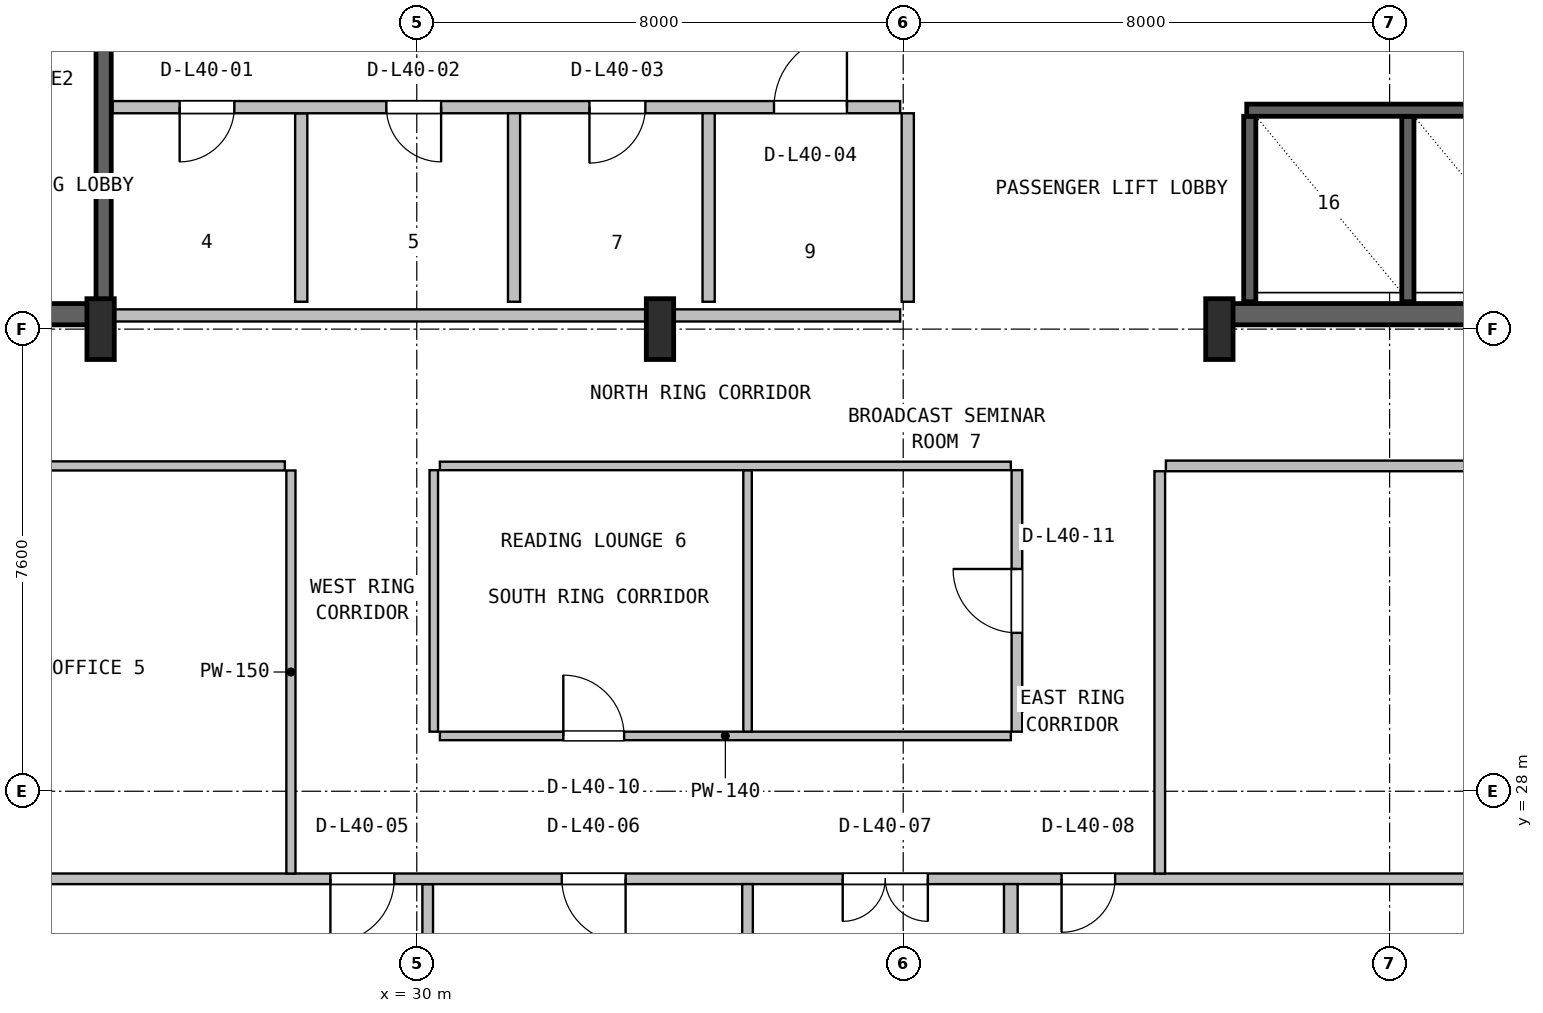
"""IFC4 building model, lengths in metres.
Left out: names, types, materials, properties, quantities, classifications, styles, units other than length and angle.
Written with IfcOpenShell. Run it as: python <this file> out.ifc"""

import sys

from ifc_helpers import new_model, si_unit, direction, frame, frame_2d, origin, origin_2d, place, context, subcontext, project, spatial, rectangle, i_section, extrude, source, transform, mapped, element, fill, save


model = new_model("IFC4")
c1 = context("Model", 3, precision=1e-05, world=origin(), true_north=direction((0.0, 1.0)))
c2 = subcontext(c1, "Body", "Model", "MODEL_VIEW")
j1 = project(units=[si_unit("LENGTHUNIT", "METRE"), si_unit("PLANEANGLEUNIT", "RADIAN")], contexts=[c1])
p1 = place(None, origin())
s1 = spatial("IfcSite", under=j1, at=p1, CompositionType="ELEMENT")
p2 = place(p1, origin())
s2 = spatial("IfcBuilding", under=s1, at=p2, CompositionType="ELEMENT")
p3 = place(p2, frame((0.0, 0.0, 164.8)))
s3 = spatial("IfcBuildingStorey", under=s2, at=p3, CompositionType="ELEMENT", Elevation=164.8)
p4 = place(p3, frame((15.67, 35.845, 0.0), z_axis=(0.0, 0.0, 1.0), x_axis=(1.0, 0.0, 0.0)))
e1 = element("IfcWall", 1, at=p4, inside=s3, PredefinedType="SHEAR", context=c2, shape_type="SweptSolid", body=[
    extrude(rectangle(XDim=9.13, YDim=0.35, at=frame_2d((4.565, 0.0))), origin(), (0.0, 0.0, 1.0), 3.55),
])
p5 = place(p4, frame((5.4, 0.0, 0.0)))
e2 = element("IfcOpeningElement", 2, at=p5, cuts=e1, PredefinedType="OPENING", context=c2, shape_type="SweptSolid", body=[
    extrude(rectangle(XDim=1.0, YDim=2.1, at=frame_2d((0.5, 1.05))), frame((0.0, 0.185, 0.0), z_axis=(0.0, -1.0, 0.0), x_axis=(1.0, 0.0, 0.0)), (0.0, 0.0, 1.0), 0.37),
])
p6 = place(p3, frame((43.2, 35.845, 0.0), z_axis=(0.0, 0.0, 1.0), x_axis=(1.0, 0.0, 0.0)))
e3 = element("IfcWall", 3, at=p6, inside=s3, PredefinedType="SHEAR", context=c2, shape_type="SweptSolid", body=[
    extrude(rectangle(XDim=9.13, YDim=0.35, at=frame_2d((4.565, 0.0))), origin(), (0.0, 0.0, 1.0), 3.55),
])
p7 = place(p6, frame((6.25, 0.0, 0.0)))
e4 = element("IfcOpeningElement", 4, at=p7, cuts=e3, PredefinedType="OPENING", context=c2, shape_type="SweptSolid", body=[
    extrude(rectangle(XDim=0.95, YDim=2.1, at=frame_2d((0.475, 1.05))), frame((0.0, 0.185, 0.0), z_axis=(0.0, -1.0, 0.0), x_axis=(1.0, 0.0, 0.0)), (0.0, 0.0, 1.0), 0.37),
])
m1 = source(origin(), c2, "Body", "SweptSolid", [
    extrude(i_section(OverallWidth=0.45, OverallDepth=1.0, WebThickness=0.016, FlangeThickness=0.03, FilletRadius=0.016, at=origin_2d()), origin(), (0.0, 0.0, 1.0), 3.8),
])
for number, where, z_axis, x_axis in (
    (5, (24.8, 35.6, 0.0), (0.0, 0.0, 1.0), (1.0, 0.0, 0.0)),
    (6, (34.0, 35.6, 0.0), (0.0, 0.0, 1.0), (1.0, 0.0, 0.0)),
    (7, (43.2, 35.6, 0.0), (0.0, 0.0, 1.0), (1.0, 0.0, 0.0)),
):
    element("IfcColumn", number, at=place(p3, frame(where, z_axis=z_axis, x_axis=x_axis)), inside=s3, PredefinedType="COLUMN", context=c2, shape_type="MappedRepresentation", body=[
        mapped(m1, transform((0.0, 0.0, 0.0), x_axis=(1.0, 0.0, 0.0), y_axis=(0.0, 1.0, 0.0), z_axis=(0.0, 0.0, 1.0), scale=1.0)),
    ])
p8 = place(p3, frame((24.85, 36.05, 0.0), z_axis=(0.0, 0.0, 1.0), x_axis=(0.0, 1.0, 0.0)))
e8 = element("IfcWall", 8, at=p8, inside=s3, PredefinedType="SHEAR", context=c2, shape_type="SweptSolid", body=[
    extrude(rectangle(XDim=10.45, YDim=0.25, at=frame_2d((5.225, 0.0))), origin(), (0.0, 0.0, 1.0), 3.55),
])
for number, where, z_axis, x_axis in (
    (9, (43.7, 36.05, 0.0), (0.0, 0.0, 1.0), (0.0, 1.0, 0.0)),
    (10, (46.3, 36.05, 0.0), (0.0, 0.0, 1.0), (0.0, 1.0, 0.0)),
):
    element("IfcWall", number, at=place(p3, frame(where, z_axis=z_axis, x_axis=x_axis)), inside=s3, PredefinedType="SHEAR", context=c2, shape_type="SweptSolid", body=[
        extrude(rectangle(XDim=3.05, YDim=0.2, at=frame_2d((1.525, 0.0))), origin(), (0.0, 0.0, 1.0), 3.55),
    ])
p9 = place(p3, frame((43.65, 39.2, 0.0), z_axis=(0.0, 0.0, 1.0), x_axis=(1.0, 0.0, 0.0)))
e11 = element("IfcWall", 11, at=p9, inside=s3, PredefinedType="SHEAR", context=c2, shape_type="SweptSolid", body=[
    extrude(rectangle(XDim=5.15, YDim=0.2, at=frame_2d((2.575, 0.0))), origin(), (0.0, 0.0, 1.0), 3.55),
])
p10 = place(p3, frame((25.0, 35.825, 0.0), z_axis=(0.0, 0.0, 1.0), x_axis=(1.0, 0.0, 0.0)))
e12 = element("IfcWall", 12, at=p10, inside=s3, PredefinedType="SOLIDWALL", context=c2, shape_type="SweptSolid", body=[
    extrude(rectangle(XDim=12.95, YDim=0.2, at=frame_2d((6.475, 0.0))), origin(), (0.0, 0.0, 1.0), 2.575),
])
p11 = place(p3, frame((28.1, 36.05, 0.0), z_axis=(0.0, 0.0, 1.0), x_axis=(0.0, 1.0, 0.0)))
e13 = element("IfcWall", 13, at=p11, inside=s3, PredefinedType="PLUMBINGWALL", context=c2, shape_type="SweptSolid", body=[
    extrude(rectangle(XDim=3.1, YDim=0.2, at=frame_2d((1.55, 0.0))), origin(), (0.0, 0.0, 1.0), 3.53),
])
p12 = place(p3, frame((25.0, 39.25, 0.0), z_axis=(0.0, 0.0, 1.0), x_axis=(1.0, 0.0, 0.0)))
e14 = element("IfcWall", 14, at=p12, inside=s3, PredefinedType="SOLIDWALL", context=c2, shape_type="SweptSolid", body=[
    extrude(rectangle(XDim=12.95, YDim=0.2, at=frame_2d((6.475, 0.0))), origin(), (0.0, 0.0, 1.0), 3.53),
])
p13 = place(p12, frame((1.1, 0.0, 0.0)))
e15 = element("IfcOpeningElement", 15, at=p13, cuts=e14, PredefinedType="OPENING", context=c2, shape_type="SweptSolid", body=[
    extrude(rectangle(XDim=0.9, YDim=2.06, at=frame_2d((0.45, 1.03))), frame((0.0, 0.11, 0.0), z_axis=(0.0, -1.0, 0.0), x_axis=(1.0, 0.0, 0.0)), (0.0, 0.0, 1.0), 0.22),
])
p14 = place(p12, frame((4.5, 0.0, 0.0)))
e16 = element("IfcOpeningElement", 16, at=p14, cuts=e14, PredefinedType="OPENING", context=c2, shape_type="SweptSolid", body=[
    extrude(rectangle(XDim=0.9, YDim=2.06, at=frame_2d((0.45, 1.03))), frame((0.0, 0.11, 0.0), z_axis=(0.0, -1.0, 0.0), x_axis=(1.0, 0.0, 0.0)), (0.0, 0.0, 1.0), 0.22),
])
p15 = place(p12, frame((7.84, 0.0, 0.0)))
e17 = element("IfcOpeningElement", 17, at=p15, cuts=e14, PredefinedType="OPENING", context=c2, shape_type="SweptSolid", body=[
    extrude(rectangle(XDim=0.92, YDim=2.08, at=frame_2d((0.46, 1.04))), frame((0.0, 0.11, 0.0), z_axis=(0.0, -1.0, 0.0), x_axis=(1.0, 0.0, 0.0)), (0.0, 0.0, 1.0), 0.22),
])
p16 = place(p12, frame((10.875, 0.0, 0.0)))
e18 = element("IfcOpeningElement", 18, at=p16, cuts=e14, PredefinedType="OPENING", context=c2, shape_type="SweptSolid", body=[
    extrude(rectangle(XDim=1.2, YDim=2.1, at=frame_2d((0.6, 1.05))), frame((0.0, 0.11, 0.0), z_axis=(0.0, -1.0, 0.0), x_axis=(1.0, 0.0, 0.0)), (0.0, 0.0, 1.0), 0.22),
])
p17 = place(p3, frame((31.6, 36.05, 0.0), z_axis=(0.0, 0.0, 1.0), x_axis=(0.0, 1.0, 0.0)))
e19 = element("IfcWall", 19, at=p17, inside=s3, PredefinedType="PLUMBINGWALL", context=c2, shape_type="SweptSolid", body=[
    extrude(rectangle(XDim=3.1, YDim=0.2, at=frame_2d((1.55, 0.0))), origin(), (0.0, 0.0, 1.0), 3.53),
])
for number, where, z_axis, x_axis in (
    (20, (34.8, 36.05, 0.0), (0.0, 0.0, 1.0), (0.0, 1.0, 0.0)),
    (21, (38.075, 36.05, 0.0), (0.0, 0.0, 1.0), (0.0, 1.0, 0.0)),
):
    element("IfcWall", number, at=place(p3, frame(where, z_axis=z_axis, x_axis=x_axis)), inside=s3, PredefinedType="SOLIDWALL", context=c2, shape_type="SweptSolid", body=[
        extrude(rectangle(XDim=3.1, YDim=0.2, at=frame_2d((1.55, 0.0))), origin(), (0.0, 0.0, 1.0), 3.53),
    ])
p18 = place(p3, frame((30.18, 7.38, 0.0), z_axis=(0.0, 0.0, 1.0), x_axis=(0.0, 1.0, 0.0)))
e22 = element("IfcWall", 22, at=p18, inside=s3, PredefinedType="PARTITIONING", context=c2, shape_type="SweptSolid", body=[
    extrude(rectangle(XDim=19.093, YDim=0.175, at=frame_2d((9.546, 0.0))), origin(), (0.0, 0.0, 1.0), 2.909),
])
p19 = place(p3, frame((7.18, 26.56, 0.0), z_axis=(0.0, 0.0, 1.0), x_axis=(1.0, 0.0, 0.0)))
e23 = element("IfcWall", 23, at=p19, inside=s3, PredefinedType="PARTITIONING", context=c2, shape_type="SweptSolid", body=[
    extrude(rectangle(XDim=53.64, YDim=0.175, at=frame_2d((26.82, 0.0))), origin(), (0.0, 0.0, 1.0), 2.909),
])
p20 = place(p19, frame((21.4, 0.0, 0.0)))
e24 = element("IfcOpeningElement", 24, at=p20, cuts=e23, PredefinedType="OPENING", context=c2, shape_type="SweptSolid", body=[
    extrude(rectangle(XDim=1.05, YDim=2.1, at=frame_2d((0.525, 1.05))), frame((0.0, 0.098, 0.0), z_axis=(0.0, -1.0, 0.0), x_axis=(1.0, 0.0, 0.0)), (0.0, 0.0, 1.0), 0.195),
])
p21 = place(p19, frame((25.205, 0.0, 0.0)))
e25 = element("IfcOpeningElement", 25, at=p21, cuts=e23, PredefinedType="OPENING", context=c2, shape_type="SweptSolid", body=[
    extrude(rectangle(XDim=1.05, YDim=2.1, at=frame_2d((0.525, 1.05))), frame((0.0, 0.098, 0.0), z_axis=(0.0, -1.0, 0.0), x_axis=(1.0, 0.0, 0.0)), (0.0, 0.0, 1.0), 0.195),
])
p22 = place(p19, frame((29.825, 0.0, 0.0)))
e26 = element("IfcOpeningElement", 26, at=p22, cuts=e23, PredefinedType="OPENING", context=c2, shape_type="SweptSolid", body=[
    extrude(rectangle(XDim=1.4, YDim=2.12, at=frame_2d((0.7, 1.06))), frame((0.0, 0.098, 0.0), z_axis=(0.0, -1.0, 0.0), x_axis=(1.0, 0.0, 0.0)), (0.0, 0.0, 1.0), 0.195),
])
p23 = place(p19, frame((33.425, 0.0, 0.0)))
e27 = element("IfcOpeningElement", 27, at=p23, cuts=e23, PredefinedType="OPENING", context=c2, shape_type="SweptSolid", body=[
    extrude(rectangle(XDim=0.88, YDim=2.06, at=frame_2d((0.44, 1.03))), frame((0.0, 0.098, 0.0), z_axis=(0.0, -1.0, 0.0), x_axis=(1.0, 0.0, 0.0)), (0.0, 0.0, 1.0), 0.195),
])
p24 = place(p3, frame((35.44, 7.38, 0.0), z_axis=(0.0, 0.0, 1.0), x_axis=(0.0, 1.0, 0.0)))
e28 = element("IfcWall", 28, at=p24, inside=s3, PredefinedType="PARTITIONING", context=c2, shape_type="SweptSolid", body=[
    extrude(rectangle(XDim=19.093, YDim=0.175, at=frame_2d((9.546, 0.0))), origin(), (0.0, 0.0, 1.0), 2.909),
])
p25 = place(p3, frame((39.77, 7.38, 0.0), z_axis=(0.0, 0.0, 1.0), x_axis=(0.0, 1.0, 0.0)))
e29 = element("IfcWall", 29, at=p25, inside=s3, PredefinedType="PARTITIONING", context=c2, shape_type="SweptSolid", body=[
    extrude(rectangle(XDim=19.093, YDim=0.225, at=frame_2d((9.546, 0.0))), origin(), (0.0, 0.0, 1.0), 2.909),
])
p26 = place(p3, frame((27.93, 26.647, 0.0), z_axis=(0.0, 0.0, 1.0), x_axis=(0.0, 1.0, 0.0)))
e30 = element("IfcWall", 30, at=p26, inside=s3, PredefinedType="PARTITIONING", context=c2, shape_type="SweptSolid", body=[
    extrude(rectangle(XDim=6.628, YDim=0.15, at=frame_2d((3.314, 0.0))), origin(), (0.0, 0.0, 1.0), 3.222),
])
p27 = place(p3, frame((7.18, 33.35, 0.0), z_axis=(0.0, 0.0, 1.0), x_axis=(1.0, 0.0, 0.0)))
e31 = element("IfcWall", 31, at=p27, inside=s3, PredefinedType="PARTITIONING", context=c2, shape_type="SweptSolid", body=[
    extrude(rectangle(XDim=20.65, YDim=0.15, at=frame_2d((10.325, 0.0))), origin(), (0.0, 0.0, 1.0), 2.909),
])
p28 = place(p27, frame((11.8, 0.0, 0.0)))
e32 = element("IfcOpeningElement", 32, at=p28, cuts=e31, PredefinedType="OPENING", context=c2, shape_type="SweptSolid", body=[
    extrude(rectangle(XDim=0.92, YDim=2.08, at=frame_2d((0.46, 1.04))), frame((0.0, 0.085, 0.0), z_axis=(0.0, -1.0, 0.0), x_axis=(1.0, 0.0, 0.0)), (0.0, 0.0, 1.0), 0.17),
])
p29 = place(p3, frame((30.38, 28.91, 0.0), z_axis=(0.0, 0.0, 1.0), x_axis=(1.0, 0.0, 0.0)))
e33 = element("IfcWall", 33, at=p29, inside=s3, PredefinedType="PARTITIONING", context=c2, shape_type="SweptSolid", body=[
    extrude(rectangle(XDim=9.39, YDim=0.14, at=frame_2d((4.695, 0.0))), origin(), (0.0, 0.0, 1.0), 2.909),
])
p30 = place(p29, frame((2.03, 0.0, 0.0)))
e34 = element("IfcOpeningElement", 34, at=p30, cuts=e33, PredefinedType="OPENING", context=c2, shape_type="SweptSolid", body=[
    extrude(rectangle(XDim=1.0, YDim=2.1, at=frame_2d((0.5, 1.05))), frame((0.0, 0.08, 0.0), z_axis=(0.0, -1.0, 0.0), x_axis=(1.0, 0.0, 0.0)), (0.0, 0.0, 1.0), 0.16),
])
p31 = place(p3, frame((35.44, 28.98, 0.0), z_axis=(0.0, 0.0, 1.0), x_axis=(0.0, 1.0, 0.0)))
e35 = element("IfcWall", 35, at=p31, inside=s3, PredefinedType="PARTITIONING", context=c2, shape_type="SweptSolid", body=[
    extrude(rectangle(XDim=4.3, YDim=0.14, at=frame_2d((2.15, 0.0))), origin(), (0.0, 0.0, 1.0), 3.222),
])
p32 = place(p3, frame((30.38, 33.35, 0.0), z_axis=(0.0, 0.0, 1.0), x_axis=(1.0, 0.0, 0.0)))
e36 = element("IfcWall", 36, at=p32, inside=s3, PredefinedType="PARTITIONING", context=c2, shape_type="SweptSolid", body=[
    extrude(rectangle(XDim=9.39, YDim=0.14, at=frame_2d((4.695, 0.0))), origin(), (0.0, 0.0, 1.0), 2.909),
])
p33 = place(p3, frame((30.28, 28.98, 0.0), z_axis=(0.0, 0.0, 1.0), x_axis=(0.0, 1.0, 0.0)))
e37 = element("IfcWall", 37, at=p33, inside=s3, PredefinedType="PARTITIONING", context=c2, shape_type="SweptSolid", body=[
    extrude(rectangle(XDim=4.3, YDim=0.14, at=frame_2d((2.15, 0.0))), origin(), (0.0, 0.0, 1.0), 3.222),
])
p34 = place(p3, frame((39.87, 28.98, 0.0), z_axis=(0.0, 0.0, 1.0), x_axis=(0.0, 1.0, 0.0)))
e38 = element("IfcWall", 38, at=p34, inside=s3, PredefinedType="PARTITIONING", context=c2, shape_type="SweptSolid", body=[
    extrude(rectangle(XDim=4.3, YDim=0.175, at=frame_2d((2.15, 0.0))), origin(), (0.0, 0.0, 1.0), 3.222),
])
p35 = place(p34, frame((1.625, 0.0, 0.0)))
e39 = element("IfcOpeningElement", 39, at=p35, cuts=e38, PredefinedType="OPENING", context=c2, shape_type="SweptSolid", body=[
    extrude(rectangle(XDim=1.05, YDim=2.1, at=frame_2d((0.525, 1.05))), frame((0.0, 0.098, 0.0), z_axis=(0.0, -1.0, 0.0), x_axis=(1.0, 0.0, 0.0)), (0.0, 0.0, 1.0), 0.195),
])
p36 = place(p3, frame((42.32, 33.35, 0.0), z_axis=(0.0, 0.0, 1.0), x_axis=(1.0, 0.0, 0.0)))
e40 = element("IfcWall", 40, at=p36, inside=s3, PredefinedType="PARTITIONING", context=c2, shape_type="SweptSolid", body=[
    extrude(rectangle(XDim=18.5, YDim=0.175, at=frame_2d((9.25, 0.0))), origin(), (0.0, 0.0, 1.0), 2.909),
])
p37 = place(p36, frame((6.79, 0.0, 0.0)))
e41 = element("IfcOpeningElement", 41, at=p37, cuts=e40, PredefinedType="OPENING", context=c2, shape_type="SweptSolid", body=[
    extrude(rectangle(XDim=1.05, YDim=2.1, at=frame_2d((0.525, 1.05))), frame((0.0, 0.098, 0.0), z_axis=(0.0, -1.0, 0.0), x_axis=(1.0, 0.0, 0.0)), (0.0, 0.0, 1.0), 0.195),
])
p38 = place(p3, frame((42.22, 26.647, 0.0), z_axis=(0.0, 0.0, 1.0), x_axis=(0.0, 1.0, 0.0)))
e42 = element("IfcWall", 42, at=p38, inside=s3, PredefinedType="PARTITIONING", context=c2, shape_type="SweptSolid", body=[
    extrude(rectangle(XDim=6.616, YDim=0.175, at=frame_2d((3.308, 0.0))), origin(), (0.0, 0.0, 1.0), 3.222),
])
m2 = source(origin(), c2, "Body", "SweptSolid", [
    extrude(rectangle(XDim=0.9, YDim=2.06, at=frame_2d((0.45, 1.03))), frame((0.0, 0.025, 0.0), z_axis=(0.0, -1.0, 0.0), x_axis=(1.0, 0.0, 0.0)), (0.0, 0.0, 1.0), 0.05),
])
p39 = place(p13, frame((0.9, 0.0, 0.0), z_axis=(0.0, 0.0, 1.0), x_axis=(-1.0, 0.0, 0.0)))
e43 = element("IfcDoor", 43, at=p39, inside=s3, OperationType="SINGLE_SWING_LEFT", PredefinedType="DOOR", context=c2, shape_type="MappedRepresentation", body=[
    mapped(m2, transform((0.0, 0.0, 0.0), x_axis=(1.0, 0.0, 0.0), y_axis=(0.0, 1.0, 0.0), z_axis=(0.0, 0.0, 1.0), scale=1.0)),
])
fill(e15, e43)
p40 = place(p14, frame((0.9, 0.0, 0.0), z_axis=(0.0, 0.0, 1.0), x_axis=(-1.0, 0.0, 0.0)))
e44 = element("IfcDoor", 44, at=p40, inside=s3, OperationType="SINGLE_SWING_RIGHT", PredefinedType="DOOR", context=c2, shape_type="MappedRepresentation", body=[
    mapped(m2, transform((0.0, 0.0, 0.0), x_axis=(1.0, 0.0, 0.0), y_axis=(0.0, 1.0, 0.0), z_axis=(0.0, 0.0, 1.0), scale=1.0)),
])
fill(e16, e44)
m3 = source(origin(), c2, "Body", "SweptSolid", [
    extrude(rectangle(XDim=0.92, YDim=2.08, at=frame_2d((0.46, 1.04))), frame((0.0, 0.025, 0.0), z_axis=(0.0, -1.0, 0.0), x_axis=(1.0, 0.0, 0.0)), (0.0, 0.0, 1.0), 0.05),
])
p41 = place(p15, frame((0.92, 0.0, 0.0), z_axis=(0.0, 0.0, 1.0), x_axis=(-1.0, 0.0, 0.0)))
e45 = element("IfcDoor", 45, at=p41, inside=s3, OperationType="SINGLE_SWING_LEFT", PredefinedType="DOOR", context=c2, shape_type="MappedRepresentation", body=[
    mapped(m3, transform((0.0, 0.0, 0.0), x_axis=(1.0, 0.0, 0.0), y_axis=(0.0, 1.0, 0.0), z_axis=(0.0, 0.0, 1.0), scale=1.0)),
])
fill(e17, e45)
m4 = source(origin(), c2, "Body", "SweptSolid", [
    extrude(rectangle(XDim=1.2, YDim=2.1, at=frame_2d((0.6, 1.05))), frame((0.0, 0.025, 0.0), z_axis=(0.0, -1.0, 0.0), x_axis=(1.0, 0.0, 0.0)), (0.0, 0.0, 1.0), 0.05),
])
p42 = place(p16, origin())
e46 = element("IfcDoor", 46, at=p42, inside=s3, OperationType="SINGLE_SWING_RIGHT", PredefinedType="DOOR", context=c2, shape_type="MappedRepresentation", body=[
    mapped(m4, transform((0.0, 0.0, 0.0), x_axis=(1.0, 0.0, 0.0), y_axis=(0.0, 1.0, 0.0), z_axis=(0.0, 0.0, 1.0), scale=1.0)),
])
fill(e18, e46)
m5 = source(origin(), c2, "Body", "SweptSolid", [
    extrude(rectangle(XDim=1.05, YDim=2.1, at=frame_2d((0.525, 1.05))), frame((0.0, 0.025, 0.0), z_axis=(0.0, -1.0, 0.0), x_axis=(1.0, 0.0, 0.0)), (0.0, 0.0, 1.0), 0.05),
])
p43 = place(p20, frame((1.05, 0.0, 0.0), z_axis=(0.0, 0.0, 1.0), x_axis=(-1.0, 0.0, 0.0)))
e47 = element("IfcDoor", 47, at=p43, inside=s3, OperationType="SINGLE_SWING_LEFT", PredefinedType="DOOR", context=c2, shape_type="MappedRepresentation", body=[
    mapped(m5, transform((0.0, 0.0, 0.0), x_axis=(1.0, 0.0, 0.0), y_axis=(0.0, 1.0, 0.0), z_axis=(0.0, 0.0, 1.0), scale=1.0)),
])
fill(e24, e47)
p44 = place(p21, frame((1.05, 0.0, 0.0), z_axis=(0.0, 0.0, 1.0), x_axis=(-1.0, 0.0, 0.0)))
e48 = element("IfcDoor", 48, at=p44, inside=s3, OperationType="SINGLE_SWING_RIGHT", PredefinedType="DOOR", context=c2, shape_type="MappedRepresentation", body=[
    mapped(m5, transform((0.0, 0.0, 0.0), x_axis=(1.0, 0.0, 0.0), y_axis=(0.0, 1.0, 0.0), z_axis=(0.0, 0.0, 1.0), scale=1.0)),
])
fill(e25, e48)
m6 = source(origin(), c2, "Body", "SweptSolid", [
    extrude(rectangle(XDim=1.4, YDim=2.12, at=frame_2d((0.7, 1.06))), frame((0.0, 0.025, 0.0), z_axis=(0.0, -1.0, 0.0), x_axis=(1.0, 0.0, 0.0)), (0.0, 0.0, 1.0), 0.05),
])
p45 = place(p22, frame((1.4, 0.0, 0.0), z_axis=(0.0, 0.0, 1.0), x_axis=(-1.0, 0.0, 0.0)))
e49 = element("IfcDoor", 49, at=p45, inside=s3, OperationType="DOUBLE_DOOR_SINGLE_SWING", PredefinedType="DOOR", context=c2, shape_type="MappedRepresentation", body=[
    mapped(m6, transform((0.0, 0.0, 0.0), x_axis=(1.0, 0.0, 0.0), y_axis=(0.0, 1.0, 0.0), z_axis=(0.0, 0.0, 1.0), scale=1.0)),
])
fill(e26, e49)
m7 = source(origin(), c2, "Body", "SweptSolid", [
    extrude(rectangle(XDim=0.88, YDim=2.06, at=frame_2d((0.44, 1.03))), frame((0.0, 0.025, 0.0), z_axis=(0.0, -1.0, 0.0), x_axis=(1.0, 0.0, 0.0)), (0.0, 0.0, 1.0), 0.05),
])
p46 = place(p23, frame((0.88, 0.0, 0.0), z_axis=(0.0, 0.0, 1.0), x_axis=(-1.0, 0.0, 0.0)))
e50 = element("IfcDoor", 50, at=p46, inside=s3, OperationType="SINGLE_SWING_LEFT", PredefinedType="DOOR", context=c2, shape_type="MappedRepresentation", body=[
    mapped(m7, transform((0.0, 0.0, 0.0), x_axis=(1.0, 0.0, 0.0), y_axis=(0.0, 1.0, 0.0), z_axis=(0.0, 0.0, 1.0), scale=1.0)),
])
fill(e27, e50)
m8 = source(origin(), c2, "Body", "SweptSolid", [
    extrude(rectangle(XDim=1.0, YDim=2.1, at=frame_2d((0.5, 1.05))), frame((0.0, 0.025, 0.0), z_axis=(0.0, -1.0, 0.0), x_axis=(1.0, 0.0, 0.0)), (0.0, 0.0, 1.0), 0.05),
])
p47 = place(p30, origin())
e51 = element("IfcDoor", 51, at=p47, inside=s3, OperationType="SINGLE_SWING_LEFT", PredefinedType="DOOR", context=c2, shape_type="MappedRepresentation", body=[
    mapped(m8, transform((0.0, 0.0, 0.0), x_axis=(1.0, 0.0, 0.0), y_axis=(0.0, 1.0, 0.0), z_axis=(0.0, 0.0, 1.0), scale=1.0)),
])
fill(e34, e51)
p48 = place(p35, origin())
e52 = element("IfcDoor", 52, at=p48, inside=s3, OperationType="SINGLE_SWING_RIGHT", PredefinedType="DOOR", context=c2, shape_type="MappedRepresentation", body=[
    mapped(m5, transform((0.0, 0.0, 0.0), x_axis=(1.0, 0.0, 0.0), y_axis=(0.0, 1.0, 0.0), z_axis=(0.0, 0.0, 1.0), scale=1.0)),
])
fill(e39, e52)
save(model, sys.argv[1])
